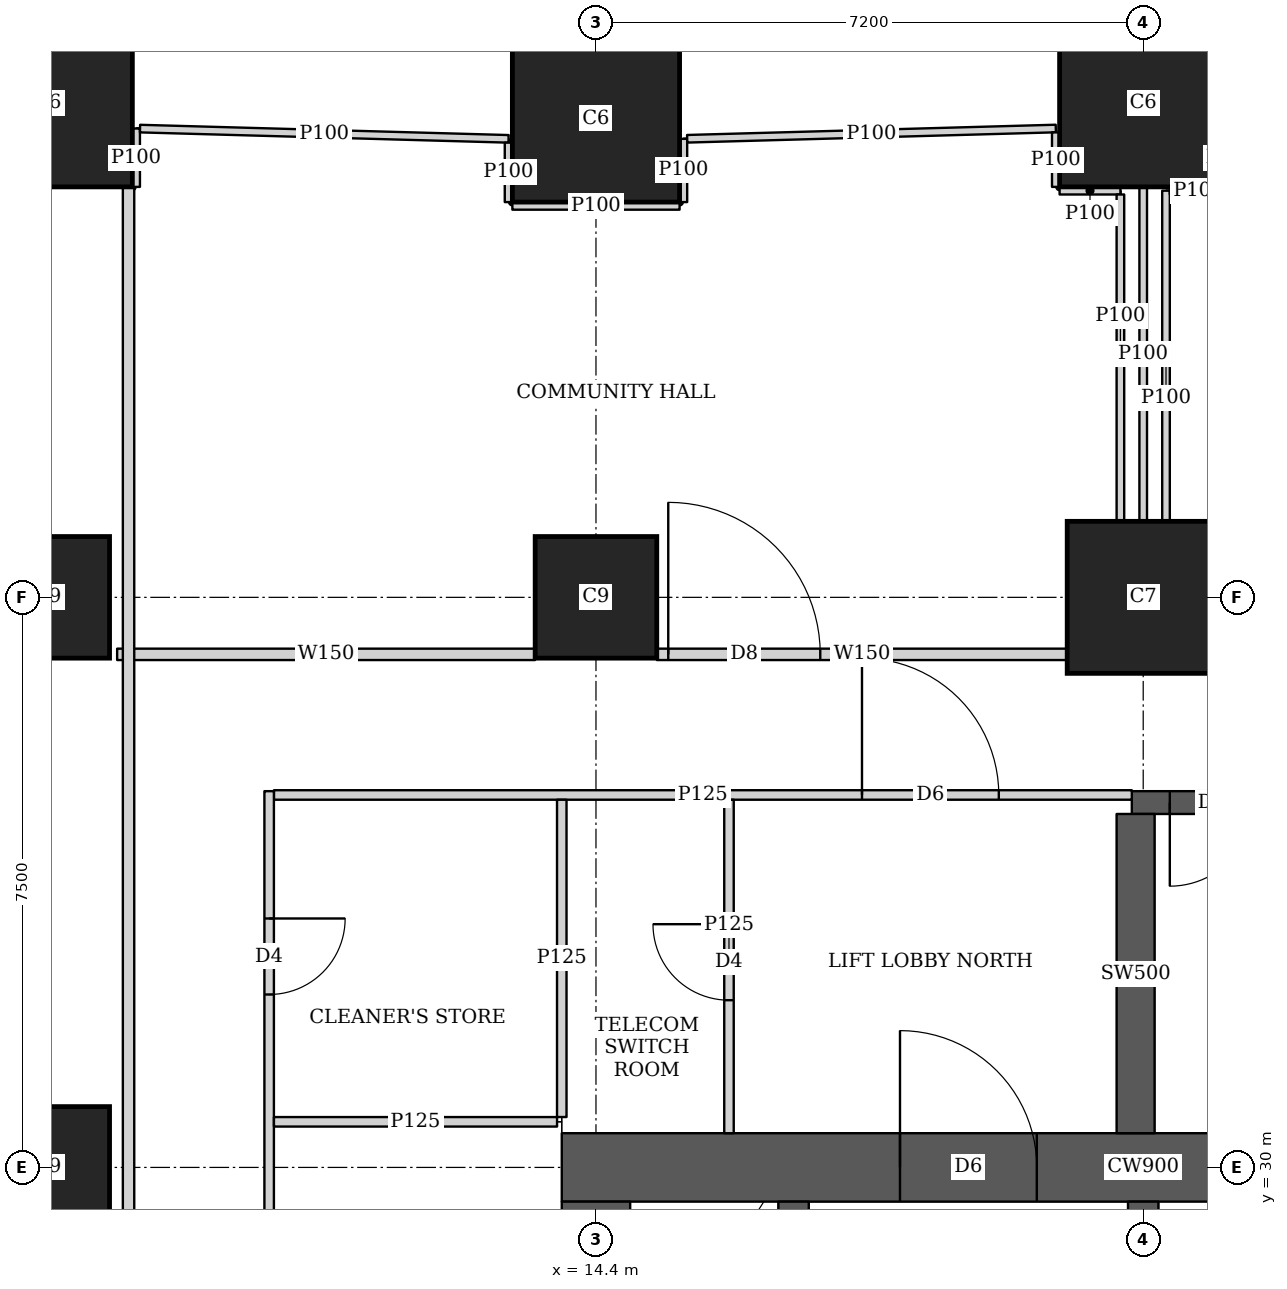
"""IFC4 building model, lengths in metres.
Left out: names, types, materials, properties, quantities, classifications, styles, units other than length and angle.
Written with IfcOpenShell. Run it as: python <this file> out.ifc"""

import sys

from ifc_helpers import new_model, si_unit, direction, frame, frame_2d, origin, origin_2d, place, context, subcontext, project, spatial, rectangle, extrude, element, fill, save


model = new_model("IFC4")
c1 = context("Model", 3, precision=1e-05, world=origin(), true_north=direction((0.0, 1.0)))
c2 = subcontext(c1, "Body", "Model", "MODEL_VIEW")
j1 = project(units=[si_unit("LENGTHUNIT", "METRE"), si_unit("PLANEANGLEUNIT", "RADIAN")], contexts=[c1])
p1 = place(None, origin())
s1 = spatial("IfcSite", under=j1, at=p1, CompositionType="ELEMENT")
p2 = place(p1, origin())
s2 = spatial("IfcBuilding", under=s1, at=p2, CompositionType="ELEMENT")
p3 = place(p2, frame((0.0, 0.0, 130.4)))
s3 = spatial("IfcBuildingStorey", under=s2, at=p3, CompositionType="ELEMENT", Elevation=130.4)
for number, where, z_axis, x_axis in (
    (1, (7.2, 30.0, 0.0), (0.0, 0.0, 1.0), (1.0, 0.0, 0.0)),
    (2, (7.2, 37.5, 0.0), (0.0, 0.0, 1.0), (1.0, 0.0, 0.0)),
    (3, (14.4, 37.5, 0.0), (0.0, 0.0, 1.0), (1.0, 0.0, 0.0)),
):
    element("IfcColumn", number, at=place(p3, frame(where, z_axis=z_axis, x_axis=x_axis)), inside=s3, PredefinedType="COLUMN", context=c2, shape_type="SweptSolid", body=[
        extrude(rectangle(XDim=1.6, YDim=1.6, at=origin_2d()), origin(), (0.0, 0.0, 1.0), 5.4),
    ])
p4 = place(p3, frame((21.6, 37.5, 0.0), z_axis=(0.0, 0.0, 1.0), x_axis=(1.0, 0.0, 0.0)))
e4 = element("IfcColumn", 4, at=p4, inside=s3, PredefinedType="COLUMN", context=c2, shape_type="SweptSolid", body=[
    extrude(rectangle(XDim=2.0, YDim=2.0, at=origin_2d()), origin(), (0.0, 0.0, 1.0), 5.4),
])
for number, where, z_axis, x_axis in (
    (5, (7.2, 44.0, 0.0), (0.0, 0.0, 1.0), (1.0, 0.0, 0.0)),
    (6, (14.4, 43.8, 0.0), (0.0, 0.0, 1.0), (1.0, 0.0, 0.0)),
    (7, (21.6, 44.0, 0.0), (0.0, 0.0, 1.0), (1.0, 0.0, 0.0)),
):
    element("IfcColumn", number, at=place(p3, frame(where, z_axis=z_axis, x_axis=x_axis)), inside=s3, PredefinedType="COLUMN", context=c2, shape_type="SweptSolid", body=[
        extrude(rectangle(XDim=2.2, YDim=2.2, at=origin_2d()), origin(), (0.0, 0.0, 1.0), 5.4),
    ])
p5 = place(p3, frame((13.95, 30.0, 0.0), z_axis=(0.0, 0.0, 1.0), x_axis=(1.0, 0.0, 0.0)))
e8 = element("IfcWall", 8, at=p5, inside=s3, PredefinedType="SHEAR", context=c2, shape_type="SweptSolid", body=[
    extrude(rectangle(XDim=15.3, YDim=0.9, at=frame_2d((7.65, 0.0))), origin(), (0.0, 0.0, 1.0), 5.4),
])
p6 = place(p5, frame((4.45, 0.0, 0.0)))
e9 = element("IfcOpeningElement", 9, at=p6, cuts=e8, PredefinedType="OPENING", context=c2, shape_type="SweptSolid", body=[
    extrude(rectangle(XDim=1.8, YDim=2.1, at=frame_2d((0.9, 1.05))), frame((0.0, 0.46, 0.0), z_axis=(0.0, -1.0, 0.0), x_axis=(1.0, 0.0, 0.0)), (0.0, 0.0, 1.0), 0.92),
])
p7 = place(p5, frame((10.7, 0.0, 0.0)))
e10 = element("IfcOpeningElement", 10, at=p7, cuts=e8, PredefinedType="OPENING", context=c2, shape_type="SweptSolid", body=[
    extrude(rectangle(XDim=1.1, YDim=2.1, at=frame_2d((0.55, 1.05))), frame((0.0, 0.46, 0.0), z_axis=(0.0, -1.0, 0.0), x_axis=(1.0, 0.0, 0.0)), (0.0, 0.0, 1.0), 0.92),
])
p8 = place(p3, frame((14.4, 15.45, 0.0), z_axis=(0.0, 0.0, 1.0), x_axis=(0.0, 1.0, 0.0)))
e11 = element("IfcWall", 11, at=p8, inside=s3, PredefinedType="SHEAR", context=c2, shape_type="SweptSolid", body=[
    extrude(rectangle(XDim=14.1, YDim=0.9, at=frame_2d((7.05, 0.0))), origin(), (0.0, 0.0, 1.0), 5.4),
])
p9 = place(p3, frame((17.0, 15.45, 0.0), z_axis=(0.0, 0.0, 1.0), x_axis=(0.0, 1.0, 0.0)))
e12 = element("IfcWall", 12, at=p9, inside=s3, PredefinedType="SHEAR", context=c2, shape_type="SweptSolid", body=[
    extrude(rectangle(XDim=14.1, YDim=0.4, at=frame_2d((7.05, 0.0))), origin(), (0.0, 0.0, 1.0), 5.4),
])
p10 = place(p9, frame((0.875, 0.0, 0.0)))
e13 = element("IfcOpeningElement", 13, at=p10, cuts=e12, PredefinedType="OPENING", context=c2, shape_type="SweptSolid", body=[
    extrude(rectangle(XDim=1.1, YDim=2.1, at=frame_2d((0.55, 1.05))), frame((0.0, 0.21, 0.0), z_axis=(0.0, -1.0, 0.0), x_axis=(1.0, 0.0, 0.0)), (0.0, 0.0, 1.0), 0.42),
])
p11 = place(p9, frame((4.625, 0.0, 0.0)))
e14 = element("IfcOpeningElement", 14, at=p11, cuts=e12, PredefinedType="OPENING", context=c2, shape_type="SweptSolid", body=[
    extrude(rectangle(XDim=1.1, YDim=2.1, at=frame_2d((0.55, 1.05))), frame((0.0, 0.21, 0.0), z_axis=(0.0, -1.0, 0.0), x_axis=(1.0, 0.0, 0.0)), (0.0, 0.0, 1.0), 0.42),
])
p12 = place(p9, frame((8.375, 0.0, 0.0)))
e15 = element("IfcOpeningElement", 15, at=p12, cuts=e12, PredefinedType="OPENING", context=c2, shape_type="SweptSolid", body=[
    extrude(rectangle(XDim=1.1, YDim=2.1, at=frame_2d((0.55, 1.05))), frame((0.0, 0.21, 0.0), z_axis=(0.0, -1.0, 0.0), x_axis=(1.0, 0.0, 0.0)), (0.0, 0.0, 1.0), 0.42),
])
p13 = place(p9, frame((12.125, 0.0, 0.0)))
e16 = element("IfcOpeningElement", 16, at=p13, cuts=e12, PredefinedType="OPENING", context=c2, shape_type="SweptSolid", body=[
    extrude(rectangle(XDim=1.1, YDim=2.1, at=frame_2d((0.55, 1.05))), frame((0.0, 0.21, 0.0), z_axis=(0.0, -1.0, 0.0), x_axis=(1.0, 0.0, 0.0)), (0.0, 0.0, 1.0), 0.42),
])
p14 = place(p3, frame((21.6, 15.45, 0.0), z_axis=(0.0, 0.0, 1.0), x_axis=(0.0, 1.0, 0.0)))
e17 = element("IfcWall", 17, at=p14, inside=s3, PredefinedType="SHEAR", context=c2, shape_type="SweptSolid", body=[
    extrude(rectangle(XDim=14.1, YDim=0.4, at=frame_2d((7.05, 0.0))), origin(), (0.0, 0.0, 1.0), 5.4),
])
p15 = place(p14, frame((0.875, 0.0, 0.0)))
e18 = element("IfcOpeningElement", 18, at=p15, cuts=e17, PredefinedType="OPENING", context=c2, shape_type="SweptSolid", body=[
    extrude(rectangle(XDim=1.1, YDim=2.1, at=frame_2d((0.55, 1.05))), frame((0.0, 0.21, 0.0), z_axis=(0.0, -1.0, 0.0), x_axis=(1.0, 0.0, 0.0)), (0.0, 0.0, 1.0), 0.42),
])
p16 = place(p14, frame((4.625, 0.0, 0.0)))
e19 = element("IfcOpeningElement", 19, at=p16, cuts=e17, PredefinedType="OPENING", context=c2, shape_type="SweptSolid", body=[
    extrude(rectangle(XDim=1.1, YDim=2.1, at=frame_2d((0.55, 1.05))), frame((0.0, 0.21, 0.0), z_axis=(0.0, -1.0, 0.0), x_axis=(1.0, 0.0, 0.0)), (0.0, 0.0, 1.0), 0.42),
])
p17 = place(p14, frame((8.375, 0.0, 0.0)))
e20 = element("IfcOpeningElement", 20, at=p17, cuts=e17, PredefinedType="OPENING", context=c2, shape_type="SweptSolid", body=[
    extrude(rectangle(XDim=1.1, YDim=2.1, at=frame_2d((0.55, 1.05))), frame((0.0, 0.21, 0.0), z_axis=(0.0, -1.0, 0.0), x_axis=(1.0, 0.0, 0.0)), (0.0, 0.0, 1.0), 0.42),
])
p18 = place(p14, frame((12.125, 0.0, 0.0)))
e21 = element("IfcOpeningElement", 21, at=p18, cuts=e17, PredefinedType="OPENING", context=c2, shape_type="SweptSolid", body=[
    extrude(rectangle(XDim=1.1, YDim=2.1, at=frame_2d((0.55, 1.05))), frame((0.0, 0.21, 0.0), z_axis=(0.0, -1.0, 0.0), x_axis=(1.0, 0.0, 0.0)), (0.0, 0.0, 1.0), 0.42),
])
p19 = place(p3, frame((21.45, 34.8, 0.0), z_axis=(0.0, 0.0, 1.0), x_axis=(1.0, 0.0, 0.0)))
e22 = element("IfcWall", 22, at=p19, inside=s3, PredefinedType="SHEAR", context=c2, shape_type="SweptSolid", body=[
    extrude(rectangle(XDim=7.5, YDim=0.3, at=frame_2d((3.75, 0.0))), origin(), (0.0, 0.0, 1.0), 5.4),
])
p20 = place(p19, frame((0.5, 0.0, 0.0)))
e23 = element("IfcOpeningElement", 23, at=p20, cuts=e22, PredefinedType="OPENING", context=c2, shape_type="SweptSolid", body=[
    extrude(rectangle(XDim=1.1, YDim=2.1, at=frame_2d((0.55, 1.05))), frame((0.0, 0.16, 0.0), z_axis=(0.0, -1.0, 0.0), x_axis=(1.0, 0.0, 0.0)), (0.0, 0.0, 1.0), 0.32),
])
p21 = place(p3, frame((21.5, 30.45, 0.0), z_axis=(0.0, 0.0, 1.0), x_axis=(0.0, 1.0, 0.0)))
e24 = element("IfcWall", 24, at=p21, inside=s3, PredefinedType="SHEAR", context=c2, shape_type="SweptSolid", body=[
    extrude(rectangle(XDim=4.2, YDim=0.5, at=frame_2d((2.1, 0.0))), origin(), (0.0, 0.0, 1.0), 5.4),
])
p22 = place(p3, frame((8.25, 2.126, 0.0), z_axis=(0.0, 0.0, 1.0), x_axis=(0.0, 1.0, 0.0)))
e25 = element("IfcWall", 25, at=p22, inside=s3, PredefinedType="SOLIDWALL", context=c2, shape_type="SweptSolid", body=[
    extrude(rectangle(XDim=40.773, YDim=0.15, at=frame_2d((20.386, 0.0))), origin(), (0.0, 0.0, 1.0), 3.55),
])
p23 = place(p22, frame((18.55, 0.0, 0.0)))
e26 = element("IfcOpeningElement", 26, at=p23, cuts=e25, PredefinedType="OPENING", context=c2, shape_type="SweptSolid", body=[
    extrude(rectangle(XDim=1.0, YDim=2.1, at=frame_2d((0.5, 1.05))), frame((0.0, 0.085, 0.0), z_axis=(0.0, -1.0, 0.0), x_axis=(1.0, 0.0, 0.0)), (0.0, 0.0, 1.0), 0.17),
])
p24 = place(p3, frame((8.1, 36.75, 0.0), z_axis=(0.0, 0.0, 1.0), x_axis=(1.0, 0.0, 0.0)))
e27 = element("IfcWall", 27, at=p24, inside=s3, PredefinedType="SOLIDWALL", context=c2, shape_type="SweptSolid", body=[
    extrude(rectangle(XDim=5.499, YDim=0.15, at=frame_2d((2.75, 0.0))), origin(), (0.0, 0.0, 1.0), 3.55),
])
p25 = place(p3, frame((15.201, 36.75, 0.0), z_axis=(0.0, 0.0, 1.0), x_axis=(1.0, 0.0, 0.0)))
e28 = element("IfcWall", 28, at=p25, inside=s3, PredefinedType="SOLIDWALL", context=c2, shape_type="SweptSolid", body=[
    extrude(rectangle(XDim=5.398, YDim=0.15, at=frame_2d((2.699, 0.0))), origin(), (0.0, 0.0, 1.0), 3.15),
])
p26 = place(p25, frame((0.15, 0.0, 0.0)))
e29 = element("IfcOpeningElement", 29, at=p26, cuts=e28, PredefinedType="OPENING", context=c2, shape_type="SweptSolid", body=[
    extrude(rectangle(XDim=2.0, YDim=2.1, at=frame_2d((1.0, 1.05))), frame((0.0, 0.085, 0.0), z_axis=(0.0, -1.0, 0.0), x_axis=(1.0, 0.0, 0.0)), (0.0, 0.0, 1.0), 0.17),
])
p27 = place(p3, frame((21.6, 38.501, 0.0), z_axis=(0.0, 0.0, 1.0), x_axis=(0.0, 1.0, 0.0)))
e30 = element("IfcWall", 30, at=p27, inside=s3, PredefinedType="PARTITIONING", context=c2, shape_type="SweptSolid", body=[
    extrude(rectangle(XDim=4.398, YDim=0.1, at=frame_2d((2.199, 0.0))), origin(), (0.0, 0.0, 1.0), 3.55),
])
p28 = place(p3, frame((10.1, 10.05, 0.0), z_axis=(0.0, 0.0, 1.0), x_axis=(0.0, 1.0, 0.0)))
e31 = element("IfcWall", 31, at=p28, inside=s3, PredefinedType="PARTITIONING", context=c2, shape_type="SweptSolid", body=[
    extrude(rectangle(XDim=24.9, YDim=0.125, at=frame_2d((12.45, 0.0))), origin(), (0.0, 0.0, 1.0), 3.55),
])
p29 = place(p28, frame((1.675, 0.0, 0.0)))
e32 = element("IfcOpeningElement", 32, at=p29, cuts=e31, PredefinedType="OPENING", context=c2, shape_type="SweptSolid", body=[
    extrude(rectangle(XDim=1.0, YDim=2.1, at=frame_2d((0.5, 1.05))), frame((0.0, 0.073, 0.0), z_axis=(0.0, -1.0, 0.0), x_axis=(1.0, 0.0, 0.0)), (0.0, 0.0, 1.0), 0.145),
])
p30 = place(p28, frame((16.0, 0.0, 0.0)))
e33 = element("IfcOpeningElement", 33, at=p30, cuts=e31, PredefinedType="OPENING", context=c2, shape_type="SweptSolid", body=[
    extrude(rectangle(XDim=1.0, YDim=2.1, at=frame_2d((0.5, 1.05))), frame((0.0, 0.073, 0.0), z_axis=(0.0, -1.0, 0.0), x_axis=(1.0, 0.0, 0.0)), (0.0, 0.0, 1.0), 0.145),
])
p31 = place(p28, frame((22.225, 0.0, 0.0)))
e34 = element("IfcOpeningElement", 34, at=p31, cuts=e31, PredefinedType="OPENING", context=c2, shape_type="SweptSolid", body=[
    extrude(rectangle(XDim=1.0, YDim=2.1, at=frame_2d((0.5, 1.05))), frame((0.0, 0.073, 0.0), z_axis=(0.0, -1.0, 0.0), x_axis=(1.0, 0.0, 0.0)), (0.0, 0.0, 1.0), 0.145),
])
p32 = place(p28, frame((6.025, 0.0, 0.0)))
e35 = element("IfcOpeningElement", 35, at=p32, cuts=e31, PredefinedType="OPENING", context=c2, shape_type="SweptSolid", body=[
    extrude(rectangle(XDim=1.0, YDim=2.1, at=frame_2d((0.5, 1.05))), frame((0.0, 0.073, 0.0), z_axis=(0.0, -1.0, 0.0), x_axis=(1.0, 0.0, 0.0)), (0.0, 0.0, 1.0), 0.145),
])
p33 = place(p28, frame((9.325, 0.0, 0.0)))
e36 = element("IfcOpeningElement", 36, at=p33, cuts=e31, PredefinedType="OPENING", context=c2, shape_type="SweptSolid", body=[
    extrude(rectangle(XDim=1.0, YDim=2.1, at=frame_2d((0.5, 1.05))), frame((0.0, 0.073, 0.0), z_axis=(0.0, -1.0, 0.0), x_axis=(1.0, 0.0, 0.0)), (0.0, 0.0, 1.0), 0.145),
])
p34 = place(p28, frame((11.1, 0.0, 0.0)))
e37 = element("IfcOpeningElement", 37, at=p34, cuts=e31, PredefinedType="OPENING", context=c2, shape_type="SweptSolid", body=[
    extrude(rectangle(XDim=1.0, YDim=2.1, at=frame_2d((0.5, 1.05))), frame((0.0, 0.073, 0.0), z_axis=(0.0, -1.0, 0.0), x_axis=(1.0, 0.0, 0.0)), (0.0, 0.0, 1.0), 0.145),
])
p35 = place(p3, frame((10.163, 30.6, 0.0), z_axis=(0.0, 0.0, 1.0), x_axis=(1.0, 0.0, 0.0)))
e38 = element("IfcWall", 38, at=p35, inside=s3, PredefinedType="PARTITIONING", context=c2, shape_type="SweptSolid", body=[
    extrude(rectangle(XDim=3.725, YDim=0.125, at=frame_2d((1.862, 0.0))), origin(), (0.0, 0.0, 1.0), 3.55),
])
p36 = place(p3, frame((13.95, 30.663, 0.0), z_axis=(0.0, 0.0, 1.0), x_axis=(0.0, 1.0, 0.0)))
e39 = element("IfcWall", 39, at=p36, inside=s3, PredefinedType="PARTITIONING", context=c2, shape_type="SweptSolid", body=[
    extrude(rectangle(XDim=4.174, YDim=0.125, at=frame_2d((2.087, 0.0))), origin(), (0.0, 0.0, 1.0), 3.55),
])
p37 = place(p3, frame((10.163, 34.9, 0.0), z_axis=(0.0, 0.0, 1.0), x_axis=(1.0, 0.0, 0.0)))
e40 = element("IfcWall", 40, at=p37, inside=s3, PredefinedType="PARTITIONING", context=c2, shape_type="SweptSolid", body=[
    extrude(rectangle(XDim=11.287, YDim=0.125, at=frame_2d((5.644, 0.0))), origin(), (0.0, 0.0, 1.0), 3.15),
])
p38 = place(p37, frame((7.737, 0.0, 0.0)))
e41 = element("IfcOpeningElement", 41, at=p38, cuts=e40, PredefinedType="OPENING", context=c2, shape_type="SweptSolid", body=[
    extrude(rectangle(XDim=1.8, YDim=2.1, at=frame_2d((0.9, 1.05))), frame((0.0, 0.073, 0.0), z_axis=(0.0, -1.0, 0.0), x_axis=(1.0, 0.0, 0.0)), (0.0, 0.0, 1.0), 0.145),
])
p39 = place(p3, frame((16.15, 30.45, 0.0), z_axis=(0.0, 0.0, 1.0), x_axis=(0.0, 1.0, 0.0)))
e42 = element("IfcWall", 42, at=p39, inside=s3, PredefinedType="PARTITIONING", context=c2, shape_type="SweptSolid", body=[
    extrude(rectangle(XDim=4.387, YDim=0.125, at=frame_2d((2.193, 0.0))), origin(), (0.0, 0.0, 1.0), 5.15),
])
p40 = place(p39, frame((1.75, 0.0, 0.0)))
e43 = element("IfcOpeningElement", 43, at=p40, cuts=e42, PredefinedType="OPENING", context=c2, shape_type="SweptSolid", body=[
    extrude(rectangle(XDim=1.0, YDim=2.1, at=frame_2d((0.5, 1.05))), frame((0.0, 0.073, 0.0), z_axis=(0.0, -1.0, 0.0), x_axis=(1.0, 0.0, 0.0)), (0.0, 0.0, 1.0), 0.145),
])
p41 = place(p3, frame((8.35, 42.9, 0.0), z_axis=(0.0, 0.0, 1.0), x_axis=(0.0, 1.0, 0.0)))
e44 = element("IfcWall", 44, at=p41, inside=s3, PredefinedType="PARTITIONING", context=c2, shape_type="SweptSolid", body=[
    extrude(rectangle(XDim=0.768, YDim=0.1, at=frame_2d((0.384, 0.0))), origin(), (0.0, 0.0, 1.0), 3.35),
])
p42 = place(p3, frame((8.401, 43.667, 0.0), z_axis=(0.0, 0.0, 1.0), x_axis=(0.999612633635, -0.027831325466, 0.0)))
e45 = element("IfcWall", 45, at=p42, inside=s3, PredefinedType="PARTITIONING", context=c2, shape_type="SweptSolid", body=[
    extrude(rectangle(XDim=4.851, YDim=0.1, at=frame_2d((2.426, 0.0))), origin(), (0.0, 0.0, 1.0), 3.35),
])
p43 = place(p3, frame((13.25, 43.482, 0.0), z_axis=(0.0, 0.0, 1.0), x_axis=(0.0, -1.0, 0.0)))
e46 = element("IfcWall", 46, at=p43, inside=s3, PredefinedType="PARTITIONING", context=c2, shape_type="SweptSolid", body=[
    extrude(rectangle(XDim=0.782, YDim=0.1, at=frame_2d((0.391, 0.0))), origin(), (0.0, 0.0, 1.0), 3.35),
])
p44 = place(p3, frame((13.3, 42.65, 0.0), z_axis=(0.0, 0.0, 1.0), x_axis=(1.0, 0.0, 0.0)))
e47 = element("IfcWall", 47, at=p44, inside=s3, PredefinedType="PARTITIONING", context=c2, shape_type="SweptSolid", body=[
    extrude(rectangle(XDim=2.2, YDim=0.1, at=frame_2d((1.1, 0.0))), origin(), (0.0, 0.0, 1.0), 3.55),
])
p45 = place(p3, frame((15.55, 42.7, 0.0), z_axis=(0.0, 0.0, 1.0), x_axis=(0.0, 1.0, 0.0)))
e48 = element("IfcWall", 48, at=p45, inside=s3, PredefinedType="PARTITIONING", context=c2, shape_type="SweptSolid", body=[
    extrude(rectangle(XDim=0.832, YDim=0.1, at=frame_2d((0.416, 0.0))), origin(), (0.0, 0.0, 1.0), 3.35),
])
p46 = place(p3, frame((15.6, 43.533, 0.0), z_axis=(0.0, 0.0, 1.0), x_axis=(0.999612750558, 0.027827125651, 0.0)))
e49 = element("IfcWall", 49, at=p46, inside=s3, PredefinedType="PARTITIONING", context=c2, shape_type="SweptSolid", body=[
    extrude(rectangle(XDim=4.852, YDim=0.1, at=frame_2d((2.426, 0.0))), origin(), (0.0, 0.0, 1.0), 3.35),
])
p47 = place(p3, frame((20.45, 43.617, 0.0), z_axis=(0.0, 0.0, 1.0), x_axis=(0.0, -1.0, 0.0)))
e50 = element("IfcWall", 50, at=p47, inside=s3, PredefinedType="PARTITIONING", context=c2, shape_type="SweptSolid", body=[
    extrude(rectangle(XDim=0.717, YDim=0.1, at=frame_2d((0.358, 0.0))), origin(), (0.0, 0.0, 1.0), 3.35),
])
p48 = place(p3, frame((20.5, 42.85, 0.0), z_axis=(0.0, 0.0, 1.0), x_axis=(1.0, 0.0, 0.0)))
e51 = element("IfcWall", 51, at=p48, inside=s3, PredefinedType="PARTITIONING", context=c2, shape_type="SweptSolid", body=[
    extrude(rectangle(XDim=0.8, YDim=0.1, at=frame_2d((0.4, 0.0))), origin(), (0.0, 0.0, 1.0), 3.55),
])
p49 = place(p3, frame((21.3, 42.8, 0.0), z_axis=(0.0, 0.0, 1.0), x_axis=(0.0, -1.0, 0.0)))
e52 = element("IfcWall", 52, at=p49, inside=s3, PredefinedType="PARTITIONING", context=c2, shape_type="SweptSolid", body=[
    extrude(rectangle(XDim=4.299, YDim=0.1, at=frame_2d((2.149, 0.0))), origin(), (0.0, 0.0, 1.0), 3.55),
])
p50 = place(p3, frame((21.9, 38.501, 0.0), z_axis=(0.0, 0.0, 1.0), x_axis=(0.0, 1.0, 0.0)))
e53 = element("IfcWall", 53, at=p50, inside=s3, PredefinedType="PARTITIONING", context=c2, shape_type="SweptSolid", body=[
    extrude(rectangle(XDim=4.349, YDim=0.1, at=frame_2d((2.175, 0.0))), origin(), (0.0, 0.0, 1.0), 3.55),
])
p51 = place(p3, frame((21.95, 42.85, 0.0), z_axis=(0.0, 0.0, 1.0), x_axis=(1.0, 0.0, 0.0)))
e54 = element("IfcWall", 54, at=p51, inside=s3, PredefinedType="PARTITIONING", context=c2, shape_type="SweptSolid", body=[
    extrude(rectangle(XDim=0.75, YDim=0.1, at=frame_2d((0.375, 0.0))), origin(), (0.0, 0.0, 1.0), 3.55),
])
p52 = place(p26, origin())
e55 = element("IfcDoor", 55, at=p52, inside=s3, OperationType="DOUBLE_DOOR_SINGLE_SWING", PredefinedType="DOOR", context=c2, shape_type="SweptSolid", body=[
    extrude(rectangle(XDim=2.0, YDim=2.1, at=frame_2d((1.0, 1.05))), frame((0.0, 0.025, 0.0), z_axis=(0.0, -1.0, 0.0), x_axis=(1.0, 0.0, 0.0)), (0.0, 0.0, 1.0), 0.05),
])
fill(e29, e55)
p53 = place(p31, origin())
e56 = element("IfcDoor", 56, at=p53, inside=s3, OperationType="SINGLE_SWING_LEFT", PredefinedType="DOOR", context=c2, shape_type="SweptSolid", body=[
    extrude(rectangle(XDim=1.0, YDim=2.1, at=frame_2d((0.5, 1.05))), frame((0.0, 0.025, 0.0), z_axis=(0.0, -1.0, 0.0), x_axis=(1.0, 0.0, 0.0)), (0.0, 0.0, 1.0), 0.05),
])
fill(e34, e56)
p54 = place(p40, origin())
e57 = element("IfcDoor", 57, at=p54, inside=s3, OperationType="SINGLE_SWING_RIGHT", PredefinedType="DOOR", context=c2, shape_type="SweptSolid", body=[
    extrude(rectangle(XDim=1.0, YDim=2.1, at=frame_2d((0.5, 1.05))), frame((0.0, 0.025, 0.0), z_axis=(0.0, -1.0, 0.0), x_axis=(1.0, 0.0, 0.0)), (0.0, 0.0, 1.0), 0.05),
])
fill(e43, e57)
p55 = place(p38, origin())
e58 = element("IfcDoor", 58, at=p55, inside=s3, OperationType="DOUBLE_DOOR_SINGLE_SWING", PredefinedType="DOOR", context=c2, shape_type="SweptSolid", body=[
    extrude(rectangle(XDim=1.8, YDim=2.1, at=frame_2d((0.9, 1.05))), frame((0.0, 0.025, 0.0), z_axis=(0.0, -1.0, 0.0), x_axis=(1.0, 0.0, 0.0)), (0.0, 0.0, 1.0), 0.05),
])
fill(e41, e58)
p56 = place(p6, origin())
e59 = element("IfcDoor", 59, at=p56, inside=s3, OperationType="DOUBLE_DOOR_SINGLE_SWING", PredefinedType="DOOR", context=c2, shape_type="SweptSolid", body=[
    extrude(rectangle(XDim=1.8, YDim=2.1, at=frame_2d((0.9, 1.05))), frame((0.0, 0.025, 0.0), z_axis=(0.0, -1.0, 0.0), x_axis=(1.0, 0.0, 0.0)), (0.0, 0.0, 1.0), 0.05),
])
fill(e9, e59)
p57 = place(p20, origin())
e60 = element("IfcDoor", 60, at=p57, inside=s3, OperationType="SINGLE_SWING_RIGHT", PredefinedType="DOOR", context=c2, shape_type="SweptSolid", body=[
    extrude(rectangle(XDim=1.1, YDim=2.1, at=frame_2d((0.55, 1.05))), frame((0.0, 0.025, 0.0), z_axis=(0.0, -1.0, 0.0), x_axis=(1.0, 0.0, 0.0)), (0.0, 0.0, 1.0), 0.05),
])
fill(e23, e60)
save(model, sys.argv[1])
